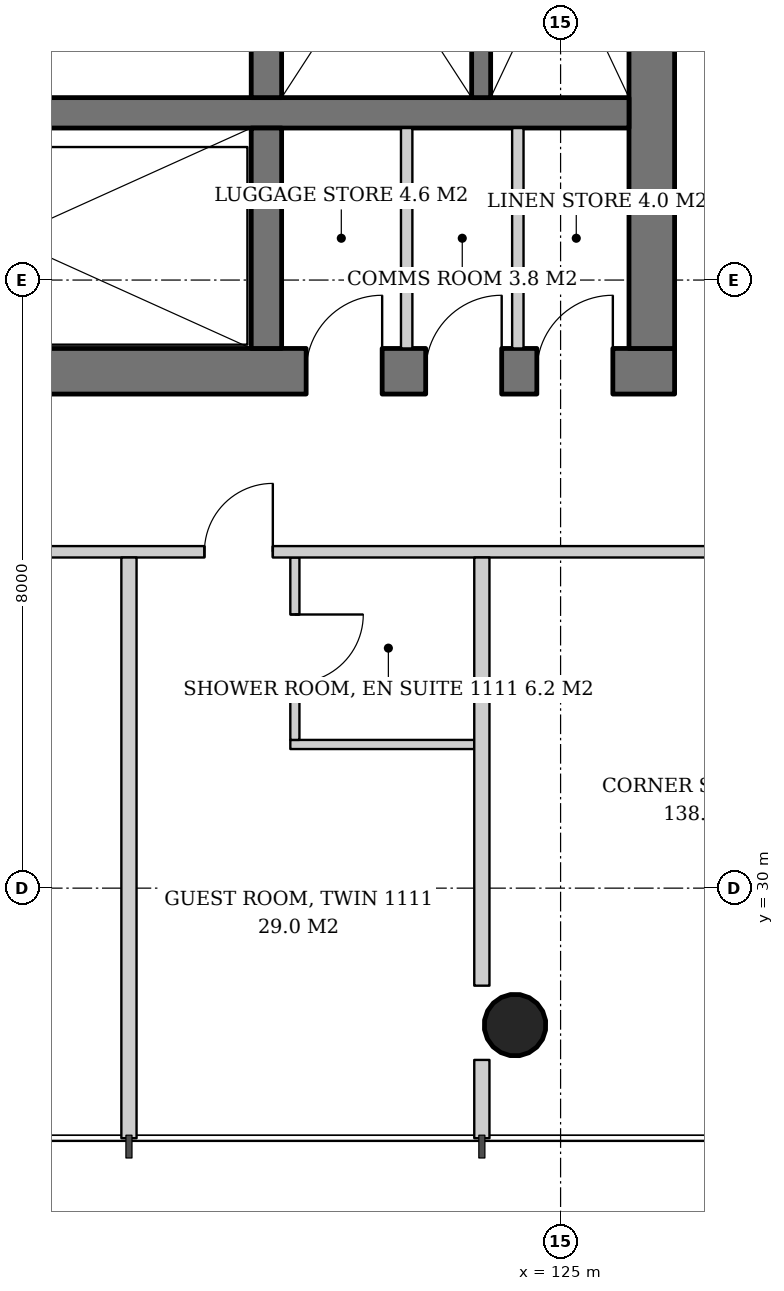
"""IFC4 building model, lengths in metres.
Left out: names, types, materials, properties, quantities, classifications, styles, units other than length and angle.
Written with IfcOpenShell. Run it as: python <this file> out.ifc"""

import sys

from ifc_helpers import new_model, si_unit, direction, frame, frame_2d, origin, origin_2d, place, context, subcontext, project, spatial, rectangle, hollow_circle, extrude, element, fill, save


model = new_model("IFC4")
c1 = context("Model", 3, precision=1e-05, world=origin(), true_north=direction((0.0, 1.0)))
c2 = subcontext(c1, "Body", "Model", "MODEL_VIEW")
j1 = project(units=[si_unit("LENGTHUNIT", "METRE"), si_unit("PLANEANGLEUNIT", "RADIAN")], contexts=[c1])
p1 = place(None, origin())
s1 = spatial("IfcSite", under=j1, at=p1, CompositionType="ELEMENT")
p2 = place(p1, origin())
s2 = spatial("IfcBuilding", under=s1, at=p2, CompositionType="ELEMENT")
p3 = place(p2, frame((0.0, 0.0, 47.6)))
s3 = spatial("IfcBuildingStorey", under=s2, at=p3, CompositionType="ELEMENT", Elevation=47.6)
p4 = place(p3, frame((124.427, 28.146, 0.0), z_axis=(-0.021563230905, 0.043062285527, 0.998839660125), x_axis=(-0.894160516368, -0.44774654769, 0.0)))
e1 = element("IfcColumn", 1, at=p4, inside=s3, PredefinedType="COLUMN", context=c2, shape_type="SweptSolid", body=[
    extrude(hollow_circle(Radius=0.406, WallThickness=0.03, at=origin_2d()), origin(), (0.0, 0.0, 1.0), 3.804),
])
p5 = place(p3, frame((107.5, 36.8, 0.0), z_axis=(0.0, 0.0, 1.0), x_axis=(1.0, 0.0, 0.0)))
e2 = element("IfcWall", 2, at=p5, inside=s3, PredefinedType="SHEAR", context=c2, shape_type="SweptSolid", body=[
    extrude(rectangle(XDim=19.0, YDim=0.6, at=frame_2d((9.5, 0.0))), origin(), (0.0, 0.0, 1.0), 3.8),
])
p6 = place(p5, frame((3.9, 0.0, 0.0)))
e3 = element("IfcOpeningElement", 3, at=p6, cuts=e2, PredefinedType="OPENING", context=c2, shape_type="SweptSolid", body=[
    extrude(rectangle(XDim=1.0, YDim=2.1, at=frame_2d((0.5, 1.05))), frame((0.0, 0.31, 0.0), z_axis=(0.0, -1.0, 0.0), x_axis=(1.0, 0.0, 0.0)), (0.0, 0.0, 1.0), 0.62),
])
p7 = place(p5, frame((14.153, 0.0, 0.0)))
e4 = element("IfcOpeningElement", 4, at=p7, cuts=e2, PredefinedType="OPENING", context=c2, shape_type="SweptSolid", body=[
    extrude(rectangle(XDim=1.0, YDim=2.1, at=frame_2d((0.5, 1.05))), frame((0.0, 0.31, 0.0), z_axis=(0.0, -1.0, 0.0), x_axis=(1.0, 0.0, 0.0)), (0.0, 0.0, 1.0), 0.62),
])
p8 = place(p5, frame((15.725, 0.0, 0.0)))
e5 = element("IfcOpeningElement", 5, at=p8, cuts=e2, PredefinedType="OPENING", context=c2, shape_type="SweptSolid", body=[
    extrude(rectangle(XDim=1.0, YDim=2.1, at=frame_2d((0.5, 1.05))), frame((0.0, 0.31, 0.0), z_axis=(0.0, -1.0, 0.0), x_axis=(1.0, 0.0, 0.0)), (0.0, 0.0, 1.0), 0.62),
])
p9 = place(p5, frame((17.188, 0.0, 0.0)))
e6 = element("IfcOpeningElement", 6, at=p9, cuts=e2, PredefinedType="OPENING", context=c2, shape_type="SweptSolid", body=[
    extrude(rectangle(XDim=1.0, YDim=2.1, at=frame_2d((0.5, 1.05))), frame((0.0, 0.31, 0.0), z_axis=(0.0, -1.0, 0.0), x_axis=(1.0, 0.0, 0.0)), (0.0, 0.0, 1.0), 0.62),
])
p10 = place(p3, frame((126.2, 37.1, 0.0), z_axis=(0.0, 0.0, 1.0), x_axis=(0.0, 1.0, 0.0)))
e7 = element("IfcWall", 7, at=p10, inside=s3, PredefinedType="SHEAR", context=c2, shape_type="SweptSolid", body=[
    extrude(rectangle(XDim=17.8, YDim=0.6, at=frame_2d((8.9, 0.0))), origin(), (0.0, 0.0, 1.0), 3.8),
])
p11 = place(p10, frame((8.0, 0.0, 0.0)))
e8 = element("IfcOpeningElement", 8, at=p11, cuts=e7, PredefinedType="OPENING", context=c2, shape_type="SweptSolid", body=[
    extrude(rectangle(XDim=1.8, YDim=2.4, at=frame_2d((0.9, 1.2))), frame((0.0, 0.31, 0.0), z_axis=(0.0, -1.0, 0.0), x_axis=(1.0, 0.0, 0.0)), (0.0, 0.0, 1.0), 0.62),
])
p12 = place(p3, frame((108.1, 40.2, 0.0), z_axis=(0.0, 0.0, 1.0), x_axis=(1.0, 0.0, 0.0)))
e9 = element("IfcWall", 9, at=p12, inside=s3, PredefinedType="SHEAR", context=c2, shape_type="SweptSolid", body=[
    extrude(rectangle(XDim=17.8, YDim=0.4, at=frame_2d((8.9, 0.0))), origin(), (0.0, 0.0, 1.0), 3.8),
])
p13 = place(p3, frame((121.13, 37.1, 0.0), z_axis=(0.0, 0.0, 1.0), x_axis=(0.0, 1.0, 0.0)))
e10 = element("IfcWall", 10, at=p13, inside=s3, PredefinedType="SHEAR", context=c2, shape_type="SweptSolid", body=[
    extrude(rectangle(XDim=2.9, YDim=0.4, at=frame_2d((1.45, 0.0))), origin(), (0.0, 0.0, 1.0), 3.8),
])
p14 = place(p3, frame((121.13, 40.4, 0.0), z_axis=(0.0, 0.0, 1.0), x_axis=(0.0, 1.0, 0.0)))
e11 = element("IfcWall", 11, at=p14, inside=s3, PredefinedType="SHEAR", context=c2, shape_type="SweptSolid", body=[
    extrude(rectangle(XDim=11.2, YDim=0.4, at=frame_2d((5.6, 0.0))), origin(), (0.0, 0.0, 1.0), 3.8),
])
p15 = place(p3, frame((123.955, 44.25, 0.0), z_axis=(0.0, 0.0, 1.0), x_axis=(0.0, -1.0, 0.0)))
e12 = element("IfcWall", 12, at=p15, inside=s3, PredefinedType="SHEAR", context=c2, shape_type="SweptSolid", body=[
    extrude(rectangle(XDim=3.85, YDim=0.25, at=frame_2d((1.925, 0.0))), origin(), (0.0, 0.0, 1.0), 3.8),
])
for number, where, z_axis, x_axis in (
    (13, (122.975, 37.1, 0.0), (0.0, 0.0, 1.0), (0.0, 1.0, 0.0)),
    (14, (124.438, 37.1, 0.0), (0.0, 0.0, 1.0), (0.0, 1.0, 0.0)),
):
    element("IfcWall", number, at=place(p3, frame(where, z_axis=z_axis, x_axis=x_axis)), inside=s3, PredefinedType="SOLIDWALL", context=c2, shape_type="SweptSolid", body=[
        extrude(rectangle(XDim=2.9, YDim=0.15, at=frame_2d((1.45, 0.0))), origin(), (0.0, 0.0, 1.0), 3.6),
    ])
p16 = place(p3, frame((121.444, 31.89, 0.0), z_axis=(0.0, 0.0, 1.0), x_axis=(1.0, 0.0, 0.0)))
e15 = element("IfcWall", 15, at=p16, inside=s3, PredefinedType="PARTITIONING", context=c2, shape_type="SweptSolid", body=[
    extrude(rectangle(XDim=2.42, YDim=0.12, at=frame_2d((1.21, 0.0))), origin(), (0.0, 0.0, 1.0), 3.6),
])
p17 = place(p3, frame((121.504, 34.35, 0.0), z_axis=(0.0, 0.0, 1.0), x_axis=(0.0, -1.0, 0.0)))
e16 = element("IfcWall", 16, at=p17, inside=s3, PredefinedType="PARTITIONING", context=c2, shape_type="SweptSolid", body=[
    extrude(rectangle(XDim=2.4, YDim=0.12, at=frame_2d((1.2, 0.0))), origin(), (0.0, 0.0, 1.0), 3.6),
])
p18 = place(p17, frame((0.75, 0.0, 0.0)))
e17 = element("IfcOpeningElement", 17, at=p18, cuts=e16, PredefinedType="OPENING", context=c2, shape_type="SweptSolid", body=[
    extrude(rectangle(XDim=0.9, YDim=2.1, at=frame_2d((0.45, 1.05))), frame((0.0, 0.07, 0.0), z_axis=(0.0, -1.0, 0.0), x_axis=(1.0, 0.0, 0.0)), (0.0, 0.0, 1.0), 0.14),
])
p19 = place(p3, frame((105.35, 34.425, 0.0), z_axis=(0.0, 0.0, 1.0), x_axis=(1.0, 0.0, 0.0)))
e18 = element("IfcWall", 18, at=p19, inside=s3, PredefinedType="PARTITIONING", context=c2, shape_type="SweptSolid", body=[
    extrude(rectangle(XDim=23.15, YDim=0.15, at=frame_2d((11.575, 0.0))), origin(), (0.0, 0.0, 1.0), 2.8),
])
p20 = place(p19, frame((1.918, 0.0, 0.0)))
e19 = element("IfcOpeningElement", 19, at=p20, cuts=e18, PredefinedType="OPENING", context=c2, shape_type="SweptSolid", body=[
    extrude(rectangle(XDim=0.9, YDim=2.1, at=frame_2d((0.45, 1.05))), frame((0.0, 0.085, 0.0), z_axis=(0.0, -1.0, 0.0), x_axis=(1.0, 0.0, 0.0)), (0.0, 0.0, 1.0), 0.17),
])
p21 = place(p19, frame((7.436, 0.0, 0.0)))
e20 = element("IfcOpeningElement", 20, at=p21, cuts=e18, PredefinedType="OPENING", context=c2, shape_type="SweptSolid", body=[
    extrude(rectangle(XDim=0.9, YDim=2.1, at=frame_2d((0.45, 1.05))), frame((0.0, 0.085, 0.0), z_axis=(0.0, -1.0, 0.0), x_axis=(1.0, 0.0, 0.0)), (0.0, 0.0, 1.0), 0.17),
])
p22 = place(p19, frame((14.964, 0.0, 0.0)))
e21 = element("IfcOpeningElement", 21, at=p22, cuts=e18, PredefinedType="OPENING", context=c2, shape_type="SweptSolid", body=[
    extrude(rectangle(XDim=0.9, YDim=2.1, at=frame_2d((0.45, 1.05))), frame((0.0, 0.085, 0.0), z_axis=(0.0, -1.0, 0.0), x_axis=(1.0, 0.0, 0.0)), (0.0, 0.0, 1.0), 0.17),
])
p23 = place(p3, frame((119.322, 34.35, 0.0), z_axis=(0.0, 0.0, 1.0), x_axis=(0.0, -1.0, 0.0)))
e22 = element("IfcWall", 22, at=p23, inside=s3, PredefinedType="PARTITIONING", context=c2, shape_type="SweptSolid", body=[
    extrude(rectangle(XDim=7.64, YDim=0.2, at=frame_2d((3.82, 0.0))), origin(), (0.0, 0.0, 1.0), 3.05),
])
p24 = place(p3, frame((123.964, 34.35, 0.0), z_axis=(0.0, 0.0, 1.0), x_axis=(0.0, -1.0, 0.0)))
e23 = element("IfcWall", 23, at=p24, inside=s3, PredefinedType="PARTITIONING", context=c2, shape_type="SweptSolid", body=[
    extrude(rectangle(XDim=5.633, YDim=0.2, at=frame_2d((2.817, 0.0))), origin(), (0.0, 0.0, 1.0), 3.6),
])
p25 = place(p3, frame((123.964, 27.74, 0.0), z_axis=(0.0, 0.0, 1.0), x_axis=(0.0, -1.0, 0.0)))
e24 = element("IfcWall", 24, at=p25, inside=s3, PredefinedType="PARTITIONING", context=c2, shape_type="SweptSolid", body=[
    extrude(rectangle(XDim=1.03, YDim=0.2, at=frame_2d((0.515, 0.0))), origin(), (0.0, 0.0, 1.0), 3.6),
])
p26 = place(p7, origin())
e25 = element("IfcDoor", 25, at=p26, inside=s3, OperationType="SINGLE_SWING_RIGHT", PredefinedType="DOOR", context=c2, shape_type="SweptSolid", body=[
    extrude(rectangle(XDim=1.0, YDim=2.1, at=frame_2d((0.5, 1.05))), frame((0.0, 0.29, 0.0), z_axis=(0.0, -1.0, 0.0), x_axis=(1.0, 0.0, 0.0)), (0.0, 0.0, 1.0), 0.05),
])
fill(e4, e25)
p27 = place(p8, origin())
e26 = element("IfcDoor", 26, at=p27, inside=s3, OperationType="SINGLE_SWING_RIGHT", PredefinedType="DOOR", context=c2, shape_type="SweptSolid", body=[
    extrude(rectangle(XDim=1.0, YDim=2.1, at=frame_2d((0.5, 1.05))), frame((0.0, 0.29, 0.0), z_axis=(0.0, -1.0, 0.0), x_axis=(1.0, 0.0, 0.0)), (0.0, 0.0, 1.0), 0.05),
])
fill(e5, e26)
p28 = place(p9, origin())
e27 = element("IfcDoor", 27, at=p28, inside=s3, OperationType="SINGLE_SWING_RIGHT", PredefinedType="DOOR", context=c2, shape_type="SweptSolid", body=[
    extrude(rectangle(XDim=1.0, YDim=2.1, at=frame_2d((0.5, 1.05))), frame((0.0, 0.29, 0.0), z_axis=(0.0, -1.0, 0.0), x_axis=(1.0, 0.0, 0.0)), (0.0, 0.0, 1.0), 0.05),
])
fill(e6, e27)
p29 = place(p18, origin())
e28 = element("IfcDoor", 28, at=p29, inside=s3, OperationType="SINGLE_SWING_LEFT", PredefinedType="DOOR", context=c2, shape_type="SweptSolid", body=[
    extrude(rectangle(XDim=0.9, YDim=2.1, at=frame_2d((0.45, 1.05))), frame((0.0, 0.025, 0.0), z_axis=(0.0, -1.0, 0.0), x_axis=(1.0, 0.0, 0.0)), (0.0, 0.0, 1.0), 0.05),
])
fill(e17, e28)
p30 = place(p22, origin())
e29 = element("IfcDoor", 29, at=p30, inside=s3, OperationType="SINGLE_SWING_RIGHT", PredefinedType="DOOR", context=c2, shape_type="SweptSolid", body=[
    extrude(rectangle(XDim=0.9, YDim=2.1, at=frame_2d((0.45, 1.05))), frame((0.0, 0.025, 0.0), z_axis=(0.0, -1.0, 0.0), x_axis=(1.0, 0.0, 0.0)), (0.0, 0.0, 1.0), 0.05),
])
fill(e21, e29)
save(model, sys.argv[1])
